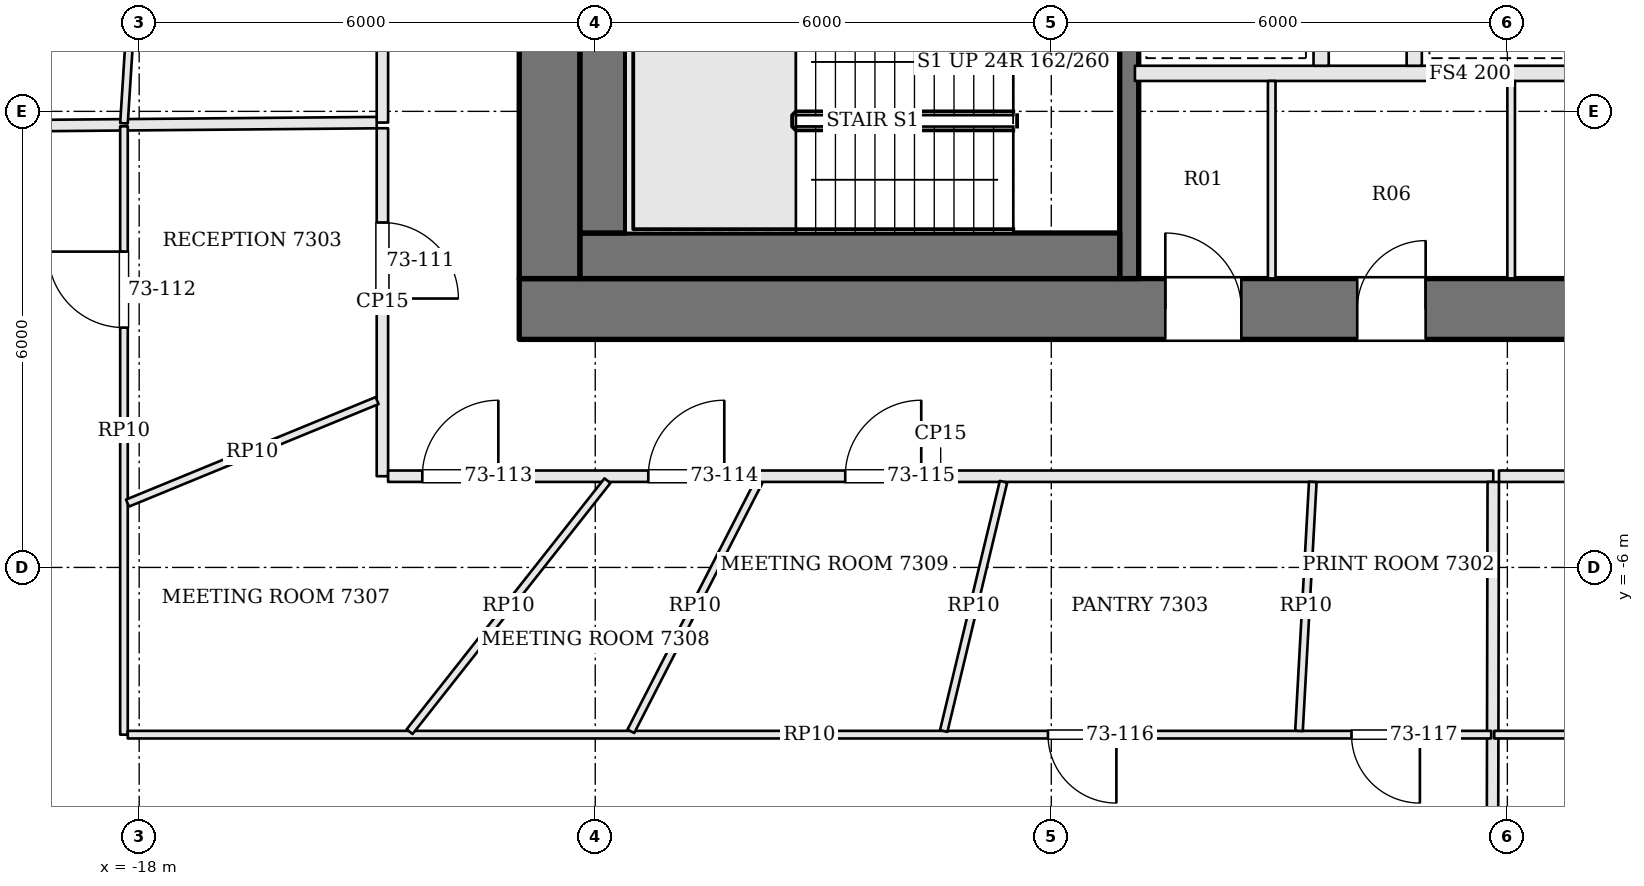
"""IFC4 building model, lengths in metres.
Left out: names, types, materials, properties, quantities, classifications, styles, units other than length and angle.
Written with IfcOpenShell. Run it as: python <this file> out.ifc"""

import sys

from ifc_helpers import new_model, si_unit, direction, frame, frame_2d, origin, place, context, subcontext, project, spatial, rectangle, extrude, element, fill, save


model = new_model("IFC4")
c1 = context("Model", 3, precision=1e-05, world=origin(), true_north=direction((0.0, 1.0)))
c2 = subcontext(c1, "Body", "Model", "MODEL_VIEW")
j1 = project(units=[si_unit("LENGTHUNIT", "METRE"), si_unit("PLANEANGLEUNIT", "RADIAN")], contexts=[c1])
p1 = place(None, origin())
s1 = spatial("IfcSite", under=j1, at=p1, CompositionType="ELEMENT")
p2 = place(p1, origin())
s2 = spatial("IfcBuilding", under=s1, at=p2, CompositionType="ELEMENT")
p3 = place(p2, frame((0.0, 0.0, 296.1)))
s3 = spatial("IfcBuildingStorey", under=s2, at=p3, CompositionType="ELEMENT", Elevation=296.1)
p4 = place(p3, frame((-13.0, -2.6, 0.0), z_axis=(0.0, 0.0, 1.0), x_axis=(1.0, 0.0, 0.0)))
e1 = element("IfcWall", 1, at=p4, inside=s3, PredefinedType="SHEAR", context=c2, shape_type="SweptSolid", body=[
    extrude(rectangle(XDim=26.0, YDim=0.8, at=frame_2d((13.0, 0.0))), origin(), (0.0, 0.0, 1.0), 3.9),
])
p5 = place(p4, frame((8.5, 0.0, 0.0)))
e2 = element("IfcOpeningElement", 2, at=p5, cuts=e1, PredefinedType="OPENING", context=c2, shape_type="SweptSolid", body=[
    extrude(rectangle(XDim=1.0, YDim=2.1, at=frame_2d((0.5, 1.05))), frame((0.0, 0.41, 0.0), z_axis=(0.0, -1.0, 0.0), x_axis=(1.0, 0.0, 0.0)), (0.0, 0.0, 1.0), 0.82),
])
p6 = place(p4, frame((11.025, 0.0, 0.0)))
e3 = element("IfcOpeningElement", 3, at=p6, cuts=e1, PredefinedType="OPENING", context=c2, shape_type="SweptSolid", body=[
    extrude(rectangle(XDim=0.9, YDim=2.1, at=frame_2d((0.45, 1.05))), frame((0.0, 0.41, 0.0), z_axis=(0.0, -1.0, 0.0), x_axis=(1.0, 0.0, 0.0)), (0.0, 0.0, 1.0), 0.82),
])
p7 = place(p4, frame((14.225, 0.0, 0.0)))
e4 = element("IfcOpeningElement", 4, at=p7, cuts=e1, PredefinedType="OPENING", context=c2, shape_type="SweptSolid", body=[
    extrude(rectangle(XDim=0.9, YDim=2.1, at=frame_2d((0.45, 1.05))), frame((0.0, 0.41, 0.0), z_axis=(0.0, -1.0, 0.0), x_axis=(1.0, 0.0, 0.0)), (0.0, 0.0, 1.0), 0.82),
])
p8 = place(p4, frame((16.6, 0.0, 0.0)))
e5 = element("IfcOpeningElement", 5, at=p8, cuts=e1, PredefinedType="OPENING", context=c2, shape_type="SweptSolid", body=[
    extrude(rectangle(XDim=1.0, YDim=2.1, at=frame_2d((0.5, 1.05))), frame((0.0, 0.41, 0.0), z_axis=(0.0, -1.0, 0.0), x_axis=(1.0, 0.0, 0.0)), (0.0, 0.0, 1.0), 0.82),
])
p9 = place(p3, frame((-12.6, -2.2, 0.0), z_axis=(0.0, 0.0, 1.0), x_axis=(0.0, 1.0, 0.0)))
e6 = element("IfcWall", 6, at=p9, inside=s3, PredefinedType="SHEAR", context=c2, shape_type="SweptSolid", body=[
    extrude(rectangle(XDim=13.4, YDim=0.8, at=frame_2d((6.7, 0.0))), origin(), (0.0, 0.0, 1.0), 3.9),
])
p10 = place(p9, frame((4.2, 0.0, 0.0)))
e7 = element("IfcOpeningElement", 7, at=p10, cuts=e6, PredefinedType="OPENING", context=c2, shape_type="SweptSolid", body=[
    extrude(rectangle(XDim=1.8, YDim=2.1, at=frame_2d((0.9, 1.05))), frame((0.0, 0.41, 0.0), z_axis=(0.0, -1.0, 0.0), x_axis=(1.0, 0.0, 0.0)), (0.0, 0.0, 1.0), 0.82),
])
p11 = place(p3, frame((-4.975, -2.2, 0.0), z_axis=(0.0, 0.0, 1.0), x_axis=(0.0, 1.0, 0.0)))
e8 = element("IfcWall", 8, at=p11, inside=s3, PredefinedType="SOLIDWALL", context=c2, shape_type="SweptSolid", body=[
    extrude(rectangle(XDim=13.4, YDim=0.25, at=frame_2d((6.7, 0.0))), origin(), (0.0, 0.0, 1.0), 3.7),
])
p12 = place(p11, frame((5.25, 0.0, 0.0)))
e9 = element("IfcOpeningElement", 9, at=p12, cuts=e8, PredefinedType="OPENING", context=c2, shape_type="SweptSolid", body=[
    extrude(rectangle(XDim=1.2, YDim=2.1, at=frame_2d((0.6, 1.05))), frame((0.0, 0.135, 0.0), z_axis=(0.0, -1.0, 0.0), x_axis=(1.0, 0.0, 0.0)), (0.0, 0.0, 1.0), 0.27),
])
p13 = place(p3, frame((-12.2, -1.9, 0.0), z_axis=(0.0, 0.0, 1.0), x_axis=(1.0, 0.0, 0.0)))
e10 = element("IfcWall", 10, at=p13, inside=s3, PredefinedType="SOLIDWALL", context=c2, shape_type="SweptSolid", body=[
    extrude(rectangle(XDim=7.1, YDim=0.6, at=frame_2d((3.55, 0.0))), origin(), (0.0, 0.0, 1.0), 3.7),
])
p14 = place(p3, frame((-11.9, -1.6, 0.0), z_axis=(0.0, 0.0, 1.0), x_axis=(0.0, 1.0, 0.0)))
e11 = element("IfcWall", 11, at=p14, inside=s3, PredefinedType="SOLIDWALL", context=c2, shape_type="SweptSolid", body=[
    extrude(rectangle(XDim=2.95, YDim=0.6, at=frame_2d((1.475, 0.0))), origin(), (0.0, 0.0, 1.0), 3.7),
])
p15 = place(p3, frame((-4.9, 0.5, 0.0), z_axis=(0.0, 0.0, 1.0), x_axis=(1.0, 0.0, 0.0)))
e12 = element("IfcWall", 12, at=p15, inside=s3, PredefinedType="SOLIDWALL", context=c2, shape_type="SweptSolid", body=[
    extrude(rectangle(XDim=9.8, YDim=0.2, at=frame_2d((4.9, 0.0))), origin(), (0.0, 0.0, 1.0), 3.7),
])
for number, where, z_axis, x_axis in (
    (13, (-2.45, 0.6, 0.0), (0.0, 0.0, 1.0), (0.0, 1.0, 0.0)),
    (14, (-1.225, 0.6, 0.0), (0.0, 0.0, 1.0), (0.0, 1.0, 0.0)),
):
    element("IfcWall", number, at=place(p3, frame(where, z_axis=z_axis, x_axis=x_axis)), inside=s3, PredefinedType="SOLIDWALL", context=c2, shape_type="SweptSolid", body=[
        extrude(rectangle(XDim=2.2, YDim=0.2, at=frame_2d((1.1, 0.0))), origin(), (0.0, 0.0, 1.0), 3.7),
    ])
for number, where, z_axis, x_axis in (
    (15, (-3.1, -2.2, 0.0), (0.0, 0.0, 1.0), (0.0, 1.0, 0.0)),
    (16, (0.05, -2.2, 0.0), (0.0, 0.0, 1.0), (0.0, 1.0, 0.0)),
):
    element("IfcWall", number, at=place(p3, frame(where, z_axis=z_axis, x_axis=x_axis)), inside=s3, PredefinedType="PARTITIONING", context=c2, shape_type="SweptSolid", body=[
        extrude(rectangle(XDim=2.6, YDim=0.1, at=frame_2d((1.3, 0.0))), origin(), (0.0, 0.0, 1.0), 3.7),
    ])
p16 = place(p3, frame((-14.8, 13.725, 0.0), z_axis=(0.0, 0.0, 1.0), x_axis=(0.0, -1.0, 0.0)))
e17 = element("IfcWall", 17, at=p16, inside=s3, PredefinedType="PARTITIONING", context=c2, shape_type="SweptSolid", body=[
    extrude(rectangle(XDim=13.872, YDim=0.15, at=frame_2d((6.936, 0.0))), origin(), (0.0, 0.0, 1.0), 3.198),
])
p17 = place(p16, frame((3.791, 0.0, 0.0)))
e18 = element("IfcOpeningElement", 18, at=p17, cuts=e17, PredefinedType="OPENING", context=c2, shape_type="SweptSolid", body=[
    extrude(rectangle(XDim=1.0, YDim=2.4, at=frame_2d((0.5, 1.2))), frame((0.0, 0.085, 0.0), z_axis=(0.0, -1.0, 0.0), x_axis=(1.0, 0.0, 0.0)), (0.0, 0.0, 1.0), 0.17),
])
p18 = place(p16, frame((10.45, 0.0, 0.0)))
e19 = element("IfcOpeningElement", 19, at=p18, cuts=e17, PredefinedType="OPENING", context=c2, shape_type="SweptSolid", body=[
    extrude(rectangle(XDim=1.0, YDim=2.1, at=frame_2d((0.5, 1.05))), frame((0.0, 0.085, 0.0), z_axis=(0.0, -1.0, 0.0), x_axis=(1.0, 0.0, 0.0)), (0.0, 0.0, 1.0), 0.17),
])
p19 = place(p3, frame((-24.384, -0.231, 0.0), z_axis=(0.0, 0.0, 1.0), x_axis=(0.999962123102, 0.008703583232, 0.0)))
e20 = element("IfcWall", 20, at=p19, inside=s3, PredefinedType="PARTITIONING", context=c2, shape_type="SweptSolid", body=[
    extrude(rectangle(XDim=9.509, YDim=0.15, at=frame_2d((4.754, 0.0))), origin(), (0.0, 0.0, 1.0), 3.234),
])
p20 = place(p3, frame((-14.8, -0.222, 0.0), z_axis=(0.0, 0.0, 1.0), x_axis=(0.0, -1.0, 0.0)))
e21 = element("IfcWall", 21, at=p20, inside=s3, PredefinedType="PARTITIONING", context=c2, shape_type="SweptSolid", body=[
    extrude(rectangle(XDim=4.578, YDim=0.15, at=frame_2d((2.289, 0.0))), origin(), (0.0, 0.0, 1.0), 3.198),
])
p21 = place(p20, frame((1.24, 0.0, 0.0)))
e22 = element("IfcOpeningElement", 22, at=p21, cuts=e21, PredefinedType="OPENING", context=c2, shape_type="SweptSolid", body=[
    extrude(rectangle(XDim=1.0, YDim=2.1, at=frame_2d((0.5, 1.05))), frame((0.0, 0.085, 0.0), z_axis=(0.0, -1.0, 0.0), x_axis=(1.0, 0.0, 0.0)), (0.0, 0.0, 1.0), 0.17),
])
p22 = place(p3, frame((-14.725, -4.8, 0.0), z_axis=(0.0, 0.0, 1.0), x_axis=(1.0, 0.0, 0.0)))
e23 = element("IfcWall", 23, at=p22, inside=s3, PredefinedType="PARTITIONING", context=c2, shape_type="SweptSolid", body=[
    extrude(rectangle(XDim=14.54, YDim=0.15, at=frame_2d((7.27, 0.0))), origin(), (0.0, 0.0, 1.0), 3.198),
])
p23 = place(p22, frame((0.45, 0.0, 0.0)))
e24 = element("IfcOpeningElement", 24, at=p23, cuts=e23, PredefinedType="OPENING", context=c2, shape_type="SweptSolid", body=[
    extrude(rectangle(XDim=1.0, YDim=2.4, at=frame_2d((0.5, 1.2))), frame((0.0, 0.085, 0.0), z_axis=(0.0, -1.0, 0.0), x_axis=(1.0, 0.0, 0.0)), (0.0, 0.0, 1.0), 0.17),
])
p24 = place(p22, frame((3.423, 0.0, 0.0)))
e25 = element("IfcOpeningElement", 25, at=p24, cuts=e23, PredefinedType="OPENING", context=c2, shape_type="SweptSolid", body=[
    extrude(rectangle(XDim=1.0, YDim=2.4, at=frame_2d((0.5, 1.2))), frame((0.0, 0.085, 0.0), z_axis=(0.0, -1.0, 0.0), x_axis=(1.0, 0.0, 0.0)), (0.0, 0.0, 1.0), 0.17),
])
p25 = place(p22, frame((6.014, 0.0, 0.0)))
e26 = element("IfcOpeningElement", 26, at=p25, cuts=e23, PredefinedType="OPENING", context=c2, shape_type="SweptSolid", body=[
    extrude(rectangle(XDim=1.0, YDim=2.4, at=frame_2d((0.5, 1.2))), frame((0.0, 0.085, 0.0), z_axis=(0.0, -1.0, 0.0), x_axis=(1.0, 0.0, 0.0)), (0.0, 0.0, 1.0), 0.17),
])
p26 = place(p3, frame((-0.213, -17.994, 0.0), z_axis=(0.0, 0.0, 1.0), x_axis=(0.002121478031, 0.999997749663, 0.0)))
e27 = element("IfcWall", 27, at=p26, inside=s3, PredefinedType="PARTITIONING", context=c2, shape_type="SweptSolid", body=[
    extrude(rectangle(XDim=13.119, YDim=0.15, at=frame_2d((6.56, 0.0))), origin(), (0.0, 0.0, 1.0), 3.234),
])
p27 = place(p3, frame((-0.11, -4.8, 0.0), z_axis=(0.0, 0.0, 1.0), x_axis=(1.0, 0.0, 0.0)))
e28 = element("IfcWall", 28, at=p27, inside=s3, PredefinedType="PARTITIONING", context=c2, shape_type="SweptSolid", body=[
    extrude(rectangle(XDim=14.91, YDim=0.15, at=frame_2d((7.455, 0.0))), origin(), (0.0, 0.0, 1.0), 3.198),
])
p28 = place(p27, frame((2.457, 0.0, 0.0)))
e29 = element("IfcOpeningElement", 29, at=p28, cuts=e28, PredefinedType="OPENING", context=c2, shape_type="SweptSolid", body=[
    extrude(rectangle(XDim=1.8, YDim=2.1, at=frame_2d((0.9, 1.05))), frame((0.0, 0.085, 0.0), z_axis=(0.0, -1.0, 0.0), x_axis=(1.0, 0.0, 0.0)), (0.0, 0.0, 1.0), 0.17),
])
p29 = place(p27, frame((7.992, 0.0, 0.0)))
e30 = element("IfcOpeningElement", 30, at=p29, cuts=e28, PredefinedType="OPENING", context=c2, shape_type="SweptSolid", body=[
    extrude(rectangle(XDim=1.0, YDim=2.4, at=frame_2d((0.5, 1.2))), frame((0.0, 0.085, 0.0), z_axis=(0.0, -1.0, 0.0), x_axis=(1.0, 0.0, 0.0)), (0.0, 0.0, 1.0), 0.17),
])
p30 = place(p27, frame((12.549, 0.0, 0.0)))
e31 = element("IfcOpeningElement", 31, at=p30, cuts=e28, PredefinedType="OPENING", context=c2, shape_type="SweptSolid", body=[
    extrude(rectangle(XDim=1.0, YDim=2.4, at=frame_2d((0.5, 1.2))), frame((0.0, 0.085, 0.0), z_axis=(0.0, -1.0, 0.0), x_axis=(1.0, 0.0, 0.0)), (0.0, 0.0, 1.0), 0.17),
])
p31 = place(p3, frame((-18.2, -0.157, 0.0), z_axis=(0.0, 0.0, 1.0), x_axis=(0.063656514624, 0.997971867412, 0.0)))
e32 = element("IfcWall", 32, at=p31, inside=s3, PredefinedType="PARTITIONING", context=c2, shape_type="SweptSolid", body=[
    extrude(rectangle(XDim=11.855, YDim=0.1, at=frame_2d((5.927, 0.0))), origin(), (0.0, 0.0, 1.0), 3.184),
])
p32 = place(p31, frame((2.732, 0.0, 0.0)))
e33 = element("IfcOpeningElement", 33, at=p32, cuts=e32, PredefinedType="OPENING", context=c2, shape_type="SweptSolid", body=[
    extrude(rectangle(XDim=0.9, YDim=2.1, at=frame_2d((0.45, 1.05))), frame((0.0, 0.06, 0.0), z_axis=(0.0, -1.0, 0.0), x_axis=(1.0, 0.0, 0.0)), (0.0, 0.0, 1.0), 0.12),
])
p33 = place(p3, frame((-18.2, -8.2, 0.0), z_axis=(0.0, 0.0, 1.0), x_axis=(0.0, 1.0, 0.0)))
e34 = element("IfcWall", 34, at=p33, inside=s3, PredefinedType="PARTITIONING", context=c2, shape_type="SweptSolid", body=[
    extrude(rectangle(XDim=8.003, YDim=0.1, at=frame_2d((4.001, 0.0))), origin(), (0.0, 0.0, 1.0), 3.184),
])
p34 = place(p33, frame((5.355, 0.0, 0.0)))
e35 = element("IfcOpeningElement", 35, at=p34, cuts=e34, PredefinedType="OPENING", context=c2, shape_type="SweptSolid", body=[
    extrude(rectangle(XDim=1.0, YDim=2.1, at=frame_2d((0.5, 1.05))), frame((0.0, 0.06, 0.0), z_axis=(0.0, -1.0, 0.0), x_axis=(1.0, 0.0, 0.0)), (0.0, 0.0, 1.0), 0.12),
])
p35 = place(p3, frame((-0.213, -8.2, 0.0), z_axis=(0.0, 0.0, 1.0), x_axis=(-1.0, 0.0, 0.0)))
e36 = element("IfcWall", 36, at=p35, inside=s3, PredefinedType="PARTITIONING", context=c2, shape_type="SweptSolid", body=[
    extrude(rectangle(XDim=17.937, YDim=0.1, at=frame_2d((8.969, 0.0))), origin(), (0.0, 0.0, 1.0), 3.184),
])
p36 = place(p35, frame((4.931, 0.0, 0.0)))
e37 = element("IfcOpeningElement", 37, at=p36, cuts=e36, PredefinedType="OPENING", context=c2, shape_type="SweptSolid", body=[
    extrude(rectangle(XDim=0.9, YDim=2.1, at=frame_2d((0.45, 1.05))), frame((0.0, 0.06, 0.0), z_axis=(0.0, -1.0, 0.0), x_axis=(1.0, 0.0, 0.0)), (0.0, 0.0, 1.0), 0.12),
])
p37 = place(p35, frame((0.938, 0.0, 0.0)))
e38 = element("IfcOpeningElement", 38, at=p37, cuts=e36, PredefinedType="OPENING", context=c2, shape_type="SweptSolid", body=[
    extrude(rectangle(XDim=0.9, YDim=2.1, at=frame_2d((0.45, 1.05))), frame((0.0, 0.06, 0.0), z_axis=(0.0, -1.0, 0.0), x_axis=(1.0, 0.0, 0.0)), (0.0, 0.0, 1.0), 0.12),
])
p38 = place(p3, frame((-14.869, -3.805, 0.0), z_axis=(0.0, 0.0, 1.0), x_axis=(-0.925100495969, -0.379722362205, 0.0)))
e39 = element("IfcWall", 39, at=p38, inside=s3, PredefinedType="PARTITIONING", context=c2, shape_type="SweptSolid", body=[
    extrude(rectangle(XDim=3.55, YDim=0.1, at=frame_2d((1.775, 0.0))), origin(), (0.0, 0.0, 1.0), 3.184),
])
p39 = place(p3, frame((-11.839, -4.859, 0.0), z_axis=(0.0, 0.0, 1.0), x_axis=(-0.619149025844, -0.78527350891, 0.0)))
e40 = element("IfcWall", 40, at=p39, inside=s3, PredefinedType="PARTITIONING", context=c2, shape_type="SweptSolid", body=[
    extrude(rectangle(XDim=4.205, YDim=0.1, at=frame_2d((2.102, 0.0))), origin(), (0.0, 0.0, 1.0), 3.184),
])
p40 = place(p3, frame((-9.845, -4.867, 0.0), z_axis=(0.0, 0.0, 1.0), x_axis=(-0.456148994618, -0.889903418754, 0.0)))
e41 = element("IfcWall", 41, at=p40, inside=s3, PredefinedType="PARTITIONING", context=c2, shape_type="SweptSolid", body=[
    extrude(rectangle(XDim=3.696, YDim=0.1, at=frame_2d((1.848, 0.0))), origin(), (0.0, 0.0, 1.0), 3.184),
])
p41 = place(p3, frame((-6.629, -4.873, 0.0), z_axis=(0.0, 0.0, 1.0), x_axis=(-0.233307223636, -0.972403074553, 0.0)))
e42 = element("IfcWall", 42, at=p41, inside=s3, PredefinedType="PARTITIONING", context=c2, shape_type="SweptSolid", body=[
    extrude(rectangle(XDim=3.372, YDim=0.1, at=frame_2d((1.686, 0.0))), origin(), (0.0, 0.0, 1.0), 3.184),
])
p42 = place(p3, frame((-2.56, -4.875, 0.0), z_axis=(0.0, 0.0, 1.0), x_axis=(-0.05530100695, -0.99846972845, 0.0)))
e43 = element("IfcWall", 43, at=p42, inside=s3, PredefinedType="PARTITIONING", context=c2, shape_type="SweptSolid", body=[
    extrude(rectangle(XDim=3.28, YDim=0.1, at=frame_2d((1.64, 0.0))), origin(), (0.0, 0.0, 1.0), 3.184),
])
p43 = place(p3, frame((18.15, -8.2, 0.0), z_axis=(0.0, 0.0, 1.0), x_axis=(-1.0, 0.0, 0.0)))
e44 = element("IfcWall", 44, at=p43, inside=s3, PredefinedType="PARTITIONING", context=c2, shape_type="SweptSolid", body=[
    extrude(rectangle(XDim=18.323, YDim=0.1, at=frame_2d((9.161, 0.0))), origin(), (0.0, 0.0, 1.0), 3.184),
])
p44 = place(p43, frame((13.702, 0.0, 0.0)))
e45 = element("IfcOpeningElement", 45, at=p44, cuts=e44, PredefinedType="OPENING", context=c2, shape_type="SweptSolid", body=[
    extrude(rectangle(XDim=1.0, YDim=2.1, at=frame_2d((0.5, 1.05))), frame((0.0, 0.06, 0.0), z_axis=(0.0, -1.0, 0.0), x_axis=(1.0, 0.0, 0.0)), (0.0, 0.0, 1.0), 0.12),
])
p45 = place(p5, origin())
e46 = element("IfcDoor", 46, at=p45, inside=s3, OperationType="SINGLE_SWING_LEFT", PredefinedType="DOOR", context=c2, shape_type="SweptSolid", body=[
    extrude(rectangle(XDim=1.0, YDim=2.1, at=frame_2d((0.5, 1.05))), frame((0.0, 0.025, 0.0), z_axis=(0.0, -1.0, 0.0), x_axis=(1.0, 0.0, 0.0)), (0.0, 0.0, 1.0), 0.05),
])
fill(e2, e46)
p46 = place(p6, origin())
e47 = element("IfcDoor", 47, at=p46, inside=s3, OperationType="SINGLE_SWING_RIGHT", PredefinedType="DOOR", context=c2, shape_type="SweptSolid", body=[
    extrude(rectangle(XDim=0.9, YDim=2.1, at=frame_2d((0.45, 1.05))), frame((0.0, 0.025, 0.0), z_axis=(0.0, -1.0, 0.0), x_axis=(1.0, 0.0, 0.0)), (0.0, 0.0, 1.0), 0.05),
])
fill(e3, e47)
p47 = place(p21, origin())
e48 = element("IfcDoor", 48, at=p47, inside=s3, OperationType="SINGLE_SWING_RIGHT", PredefinedType="DOOR", context=c2, shape_type="SweptSolid", body=[
    extrude(rectangle(XDim=1.0, YDim=2.1, at=frame_2d((0.5, 1.05))), frame((0.0, 0.025, 0.0), z_axis=(0.0, -1.0, 0.0), x_axis=(1.0, 0.0, 0.0)), (0.0, 0.0, 1.0), 0.05),
])
fill(e22, e48)
p48 = place(p34, origin())
e49 = element("IfcDoor", 49, at=p48, inside=s3, OperationType="SINGLE_SWING_RIGHT", PredefinedType="DOOR", context=c2, shape_type="SweptSolid", body=[
    extrude(rectangle(XDim=1.0, YDim=2.1, at=frame_2d((0.5, 1.05))), frame((0.0, 0.025, 0.0), z_axis=(0.0, -1.0, 0.0), x_axis=(1.0, 0.0, 0.0)), (0.0, 0.0, 1.0), 0.05),
])
fill(e35, e49)
p49 = place(p23, origin())
e50 = element("IfcDoor", 50, at=p49, inside=s3, OperationType="SINGLE_SWING_RIGHT", PredefinedType="DOOR", context=c2, shape_type="SweptSolid", body=[
    extrude(rectangle(XDim=1.0, YDim=2.4, at=frame_2d((0.5, 1.2))), frame((0.0, 0.025, 0.0), z_axis=(0.0, -1.0, 0.0), x_axis=(1.0, 0.0, 0.0)), (0.0, 0.0, 1.0), 0.05),
])
fill(e24, e50)
p50 = place(p24, origin())
e51 = element("IfcDoor", 51, at=p50, inside=s3, OperationType="SINGLE_SWING_RIGHT", PredefinedType="DOOR", context=c2, shape_type="SweptSolid", body=[
    extrude(rectangle(XDim=1.0, YDim=2.4, at=frame_2d((0.5, 1.2))), frame((0.0, 0.025, 0.0), z_axis=(0.0, -1.0, 0.0), x_axis=(1.0, 0.0, 0.0)), (0.0, 0.0, 1.0), 0.05),
])
fill(e25, e51)
p51 = place(p25, origin())
e52 = element("IfcDoor", 52, at=p51, inside=s3, OperationType="SINGLE_SWING_RIGHT", PredefinedType="DOOR", context=c2, shape_type="SweptSolid", body=[
    extrude(rectangle(XDim=1.0, YDim=2.4, at=frame_2d((0.5, 1.2))), frame((0.0, 0.025, 0.0), z_axis=(0.0, -1.0, 0.0), x_axis=(1.0, 0.0, 0.0)), (0.0, 0.0, 1.0), 0.05),
])
fill(e26, e52)
p52 = place(p36, origin())
e53 = element("IfcDoor", 53, at=p52, inside=s3, OperationType="SINGLE_SWING_LEFT", PredefinedType="DOOR", context=c2, shape_type="SweptSolid", body=[
    extrude(rectangle(XDim=0.9, YDim=2.1, at=frame_2d((0.45, 1.05))), frame((0.0, 0.025, 0.0), z_axis=(0.0, -1.0, 0.0), x_axis=(1.0, 0.0, 0.0)), (0.0, 0.0, 1.0), 0.05),
])
fill(e37, e53)
p53 = place(p37, origin())
e54 = element("IfcDoor", 54, at=p53, inside=s3, OperationType="SINGLE_SWING_LEFT", PredefinedType="DOOR", context=c2, shape_type="SweptSolid", body=[
    extrude(rectangle(XDim=0.9, YDim=2.1, at=frame_2d((0.45, 1.05))), frame((0.0, 0.025, 0.0), z_axis=(0.0, -1.0, 0.0), x_axis=(1.0, 0.0, 0.0)), (0.0, 0.0, 1.0), 0.05),
])
fill(e38, e54)
save(model, sys.argv[1])
